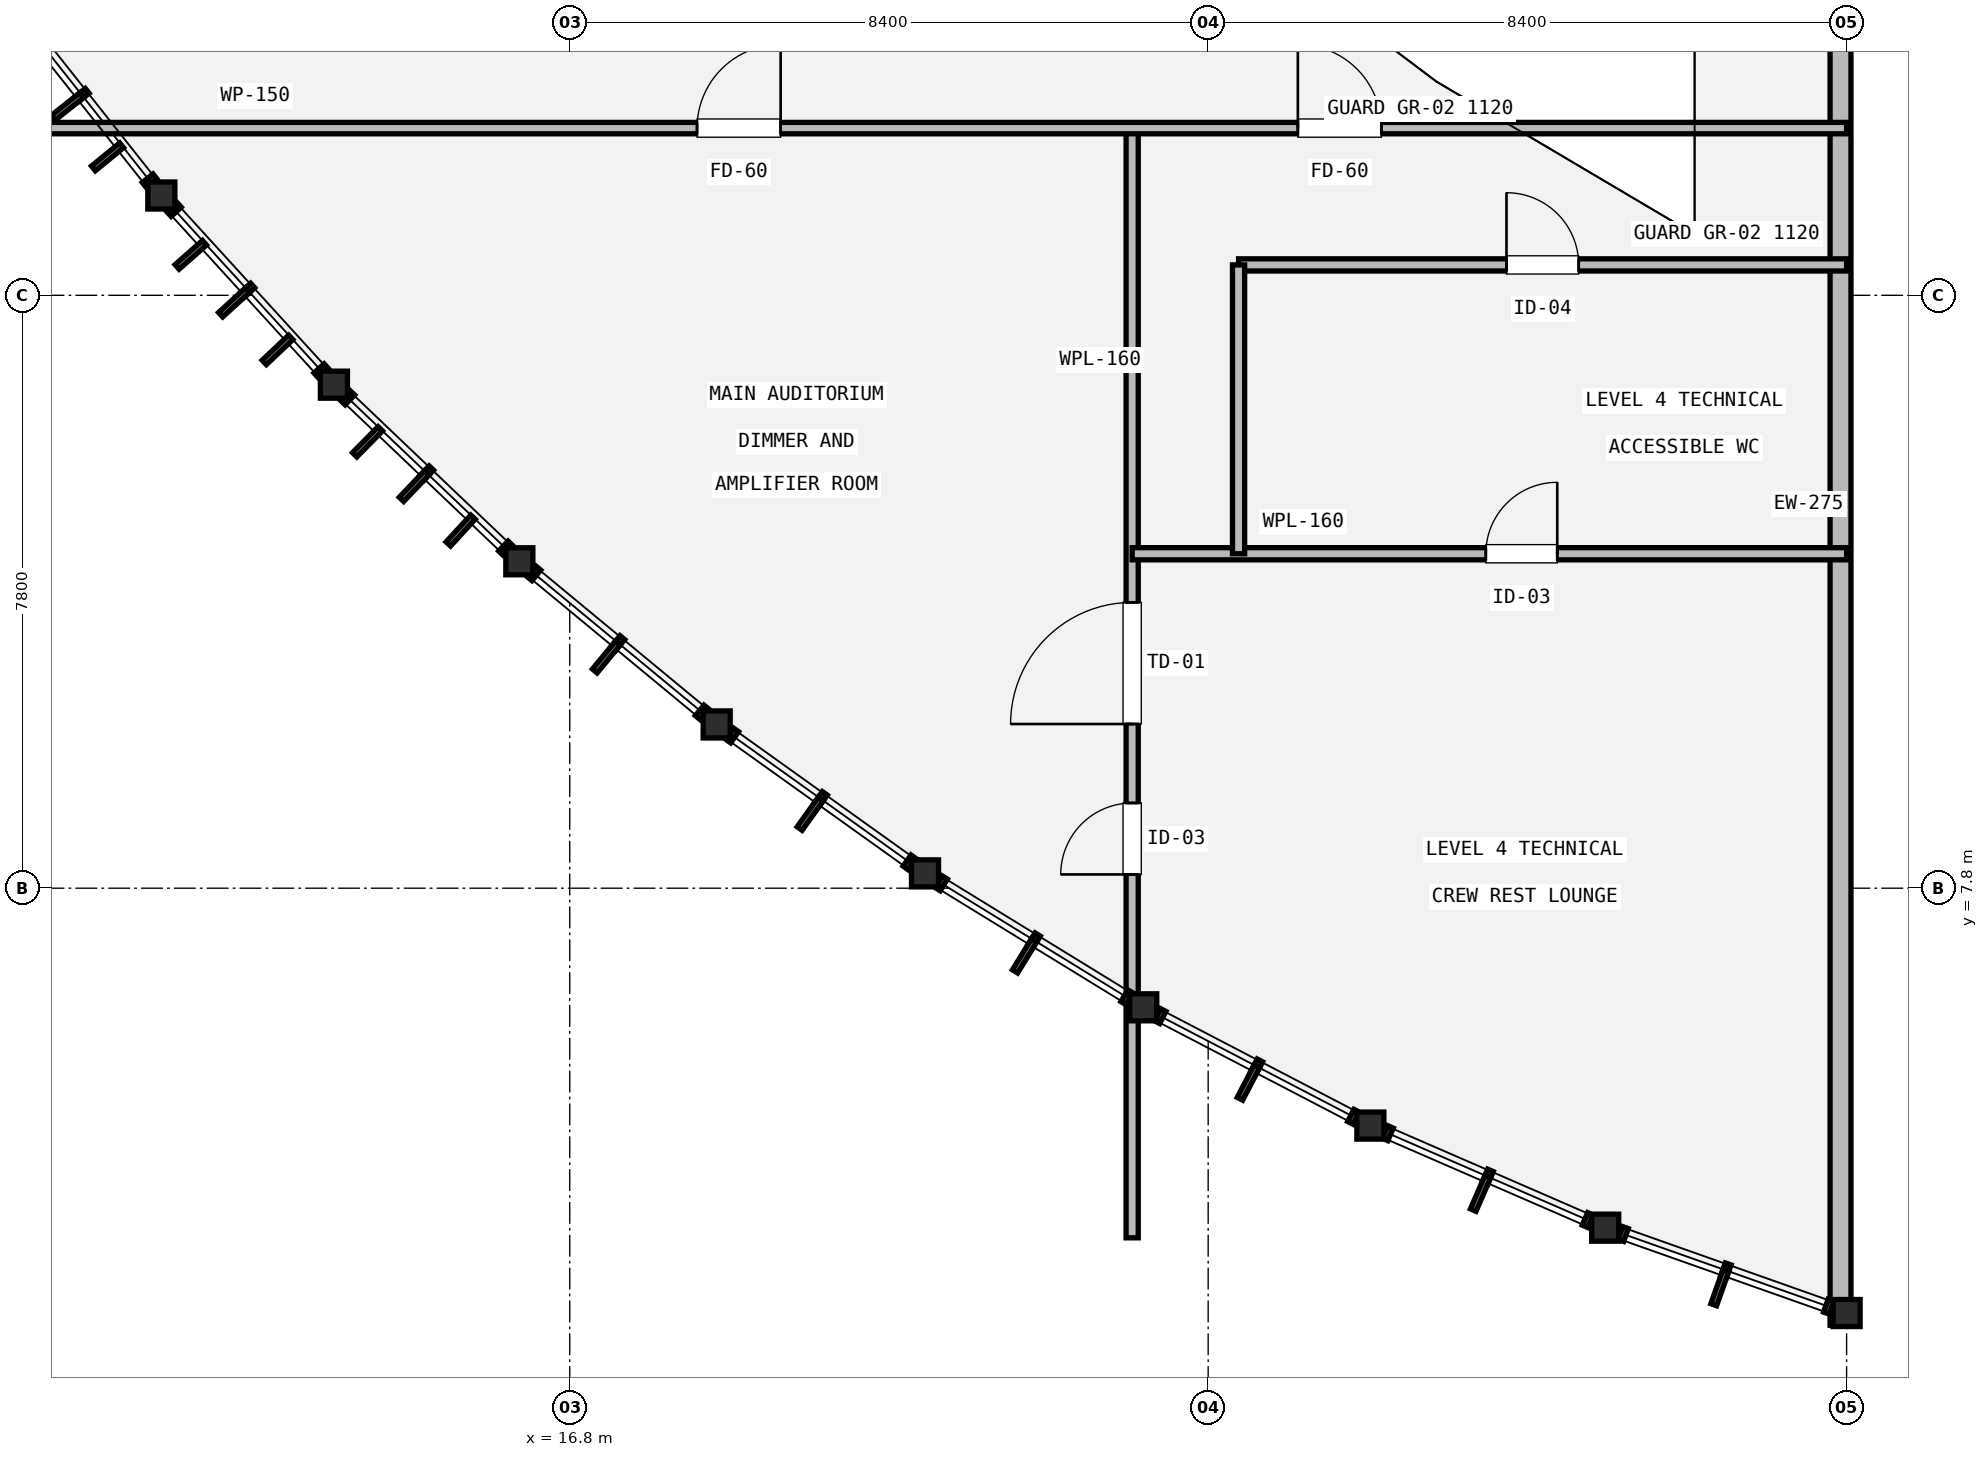
"""IFC4 building model, lengths in metres.
Left out: names, types, materials, properties, quantities, classifications, styles, units other than length and angle.
Written with IfcOpenShell. Run it as: python <this file> out.ifc"""

import sys

from ifc_helpers import new_model, si_unit, direction, frame, frame_2d, origin, origin_2d, place, context, subcontext, project, spatial, rectangle, hollow_circle, extrude, element, fill, save


model = new_model("IFC4")
c1 = context("Model", 3, precision=1e-05, world=origin(), true_north=direction((0.0, 1.0)))
c2 = subcontext(c1, "Body", "Model", "MODEL_VIEW")
j1 = project(units=[si_unit("LENGTHUNIT", "METRE"), si_unit("PLANEANGLEUNIT", "RADIAN")], contexts=[c1])
p1 = place(None, origin())
s1 = spatial("IfcSite", under=j1, at=p1, CompositionType="ELEMENT")
p2 = place(p1, origin())
s2 = spatial("IfcBuilding", under=s1, at=p2, CompositionType="ELEMENT")
p3 = place(p2, frame((0.0, 0.0, 19.2)))
s3 = spatial("IfcBuildingStorey", under=s2, at=p3, CompositionType="ELEMENT", Elevation=19.2)
for number, where, z_axis, x_axis in (
    (1, (11.427, 16.913, 0.0), (0.0, 0.0, 1.0), (1.0, 0.0, 0.0)),
    (2, (13.698, 14.424, 0.0), (0.0, 0.0, 1.0), (1.0, 0.0, 0.0)),
    (3, (16.137, 12.101, 0.0), (0.0, 0.0, 1.0), (1.0, 0.0, 0.0)),
    (4, (18.734, 9.954, 0.0), (0.0, 0.0, 1.0), (1.0, 0.0, 0.0)),
    (5, (21.474, 7.995, 0.0), (0.0, 0.0, 1.0), (1.0, 0.0, 0.0)),
    (6, (24.346, 6.233, 0.0), (0.0, 0.0, 1.0), (1.0, 0.0, 0.0)),
    (7, (27.334, 4.677, 0.0), (0.0, 0.0, 1.0), (1.0, 0.0, 0.0)),
    (8, (30.424, 3.334, 0.0), (0.0, 0.0, 1.0), (1.0, 0.0, 0.0)),
    (9, (33.6, 2.211, 0.0), (0.0, 0.0, 1.0), (1.0, 0.0, 0.0)),
):
    element("IfcColumn", number, at=place(p3, frame(where, z_axis=z_axis, x_axis=x_axis)), inside=s3, PredefinedType="COLUMN", context=c2, shape_type="SweptSolid", body=[
        extrude(hollow_circle(Radius=0.178, WallThickness=0.016, at=origin_2d()), origin(), (0.0, 0.0, 1.0), 4.2),
    ])
p4 = place(p3, frame((33.52, 2.05, 0.0), z_axis=(0.0, 0.0, 1.0), x_axis=(0.0, 1.0, 0.0)))
e10 = element("IfcWall", 10, at=p4, inside=s3, PredefinedType="STANDARD", context=c2, shape_type="SweptSolid", body=[
    extrude(rectangle(XDim=21.6, YDim=0.275, at=frame_2d((10.8, 0.0))), origin(), (0.0, 0.0, 1.0), 3.222),
])
p5 = place(p3, frame((24.2, 3.2, 0.0), z_axis=(0.0, 0.0, 1.0), x_axis=(0.0, 1.0, 0.0)))
e11 = element("IfcWall", 11, at=p5, inside=s3, PredefinedType="PLUMBINGWALL", context=c2, shape_type="SweptSolid", body=[
    extrude(rectangle(XDim=14.6, YDim=0.16, at=frame_2d((7.3, 0.0))), origin(), (0.0, 0.0, 1.0), 3.692),
])
p6 = place(p5, frame((4.781, 0.0, 0.0)))
e12 = element("IfcOpeningElement", 12, at=p6, cuts=e11, PredefinedType="OPENING", context=c2, shape_type="SweptSolid", body=[
    extrude(rectangle(XDim=0.94, YDim=2.1, at=frame_2d((0.47, 1.05))), frame((0.0, 0.09, 0.0), z_axis=(0.0, -1.0, 0.0), x_axis=(1.0, 0.0, 0.0)), (0.0, 0.0, 1.0), 0.18),
])
p7 = place(p5, frame((6.76, 0.0, 0.0)))
e13 = element("IfcOpeningElement", 13, at=p7, cuts=e11, PredefinedType="OPENING", context=c2, shape_type="SweptSolid", body=[
    extrude(rectangle(XDim=1.6, YDim=1.4, at=frame_2d((0.8, 0.7))), frame((0.0, 0.09, 0.0), z_axis=(0.0, -1.0, 0.0), x_axis=(1.0, 0.0, 0.0)), (0.0, 0.0, 1.0), 0.18),
])
p8 = place(p3, frame((24.2, 12.2, 0.0), z_axis=(0.0, 0.0, 1.0), x_axis=(1.0, 0.0, 0.0)))
e14 = element("IfcWall", 14, at=p8, inside=s3, PredefinedType="PLUMBINGWALL", context=c2, shape_type="SweptSolid", body=[
    extrude(rectangle(XDim=9.4, YDim=0.16, at=frame_2d((4.7, 0.0))), origin(), (0.0, 0.0, 1.0), 3.952),
])
p9 = place(p8, frame((4.653, 0.0, 0.0)))
e15 = element("IfcOpeningElement", 15, at=p9, cuts=e14, PredefinedType="OPENING", context=c2, shape_type="SweptSolid", body=[
    extrude(rectangle(XDim=0.94, YDim=2.1, at=frame_2d((0.47, 1.05))), frame((0.0, 0.09, 0.0), z_axis=(0.0, -1.0, 0.0), x_axis=(1.0, 0.0, 0.0)), (0.0, 0.0, 1.0), 0.18),
])
p10 = place(p3, frame((25.6, 16.0, 0.0), z_axis=(0.0, 0.0, 1.0), x_axis=(1.0, 0.0, 0.0)))
e16 = element("IfcWall", 16, at=p10, inside=s3, PredefinedType="PLUMBINGWALL", context=c2, shape_type="SweptSolid", body=[
    extrude(rectangle(XDim=8.0, YDim=0.16, at=frame_2d((4.0, 0.0))), origin(), (0.0, 0.0, 1.0), 3.952),
])
p11 = place(p10, frame((3.525, 0.0, 0.0)))
e17 = element("IfcOpeningElement", 17, at=p11, cuts=e16, PredefinedType="OPENING", context=c2, shape_type="SweptSolid", body=[
    extrude(rectangle(XDim=0.95, YDim=2.1, at=frame_2d((0.475, 1.05))), frame((0.0, 0.09, 0.0), z_axis=(0.0, -1.0, 0.0), x_axis=(1.0, 0.0, 0.0)), (0.0, 0.0, 1.0), 0.18),
])
p12 = place(p3, frame((25.6, 12.2, 0.0), z_axis=(0.0, 0.0, 1.0), x_axis=(0.0, 1.0, 0.0)))
e18 = element("IfcWall", 18, at=p12, inside=s3, PredefinedType="PLUMBINGWALL", context=c2, shape_type="SweptSolid", body=[
    extrude(rectangle(XDim=3.8, YDim=0.16, at=frame_2d((1.9, 0.0))), origin(), (0.0, 0.0, 1.0), 3.952),
])
p13 = place(p3, frame((7.0, 17.8, 0.0), z_axis=(0.0, 0.0, 1.0), x_axis=(1.0, 0.0, 0.0)))
e19 = element("IfcWall", 19, at=p13, inside=s3, PredefinedType="PARTITIONING", context=c2, shape_type="SweptSolid", body=[
    extrude(rectangle(XDim=26.6, YDim=0.15, at=frame_2d((13.3, 0.0))), origin(), (0.0, 0.0, 1.0), 3.692),
])
p14 = place(p13, frame((11.475, 0.0, 0.0)))
e20 = element("IfcOpeningElement", 20, at=p14, cuts=e19, PredefinedType="OPENING", context=c2, shape_type="SweptSolid", body=[
    extrude(rectangle(XDim=1.1, YDim=2.15, at=frame_2d((0.55, 1.075))), frame((0.0, 0.085, 0.0), z_axis=(0.0, -1.0, 0.0), x_axis=(1.0, 0.0, 0.0)), (0.0, 0.0, 1.0), 0.17),
])
p15 = place(p13, frame((19.38, 0.0, 0.0)))
e21 = element("IfcOpeningElement", 21, at=p15, cuts=e19, PredefinedType="OPENING", context=c2, shape_type="SweptSolid", body=[
    extrude(rectangle(XDim=1.1, YDim=2.15, at=frame_2d((0.55, 1.075))), frame((0.0, 0.085, 0.0), z_axis=(0.0, -1.0, 0.0), x_axis=(1.0, 0.0, 0.0)), (0.0, 0.0, 1.0), 0.17),
])
p16 = place(p6, origin())
e22 = element("IfcDoor", 22, at=p16, inside=s3, OperationType="SINGLE_SWING_LEFT", PredefinedType="DOOR", context=c2, shape_type="SweptSolid", body=[
    extrude(rectangle(XDim=0.94, YDim=2.1, at=frame_2d((0.47, 1.05))), frame((0.0, 0.025, 0.0), z_axis=(0.0, -1.0, 0.0), x_axis=(1.0, 0.0, 0.0)), (0.0, 0.0, 1.0), 0.05),
])
fill(e12, e22)
p17 = place(p7, origin())
e23 = element("IfcDoor", 23, at=p17, inside=s3, OperationType="SWING_FIXED_LEFT", PredefinedType="TRAPDOOR", context=c2, shape_type="SweptSolid", body=[
    extrude(rectangle(XDim=1.6, YDim=1.4, at=frame_2d((0.8, 0.7))), frame((0.0, 0.025, 0.0), z_axis=(0.0, -1.0, 0.0), x_axis=(1.0, 0.0, 0.0)), (0.0, 0.0, 1.0), 0.05),
])
fill(e13, e23)
p18 = place(p9, origin())
e24 = element("IfcDoor", 24, at=p18, inside=s3, OperationType="SINGLE_SWING_RIGHT", PredefinedType="DOOR", context=c2, shape_type="SweptSolid", body=[
    extrude(rectangle(XDim=0.94, YDim=2.1, at=frame_2d((0.47, 1.05))), frame((0.0, 0.025, 0.0), z_axis=(0.0, -1.0, 0.0), x_axis=(1.0, 0.0, 0.0)), (0.0, 0.0, 1.0), 0.05),
])
fill(e15, e24)
p19 = place(p11, origin())
e25 = element("IfcDoor", 25, at=p19, inside=s3, OperationType="SINGLE_SWING_LEFT", PredefinedType="DOOR", context=c2, shape_type="SweptSolid", body=[
    extrude(rectangle(XDim=0.95, YDim=2.1, at=frame_2d((0.475, 1.05))), frame((0.0, 0.025, 0.0), z_axis=(0.0, -1.0, 0.0), x_axis=(1.0, 0.0, 0.0)), (0.0, 0.0, 1.0), 0.05),
])
fill(e17, e25)
p20 = place(p14, origin())
e26 = element("IfcDoor", 26, at=p20, inside=s3, OperationType="SINGLE_SWING_RIGHT", PredefinedType="DOOR", context=c2, shape_type="SweptSolid", body=[
    extrude(rectangle(XDim=1.1, YDim=2.15, at=frame_2d((0.55, 1.075))), frame((0.0, 0.025, 0.0), z_axis=(0.0, -1.0, 0.0), x_axis=(1.0, 0.0, 0.0)), (0.0, 0.0, 1.0), 0.05),
])
fill(e20, e26)
p21 = place(p15, origin())
e27 = element("IfcDoor", 27, at=p21, inside=s3, OperationType="SINGLE_SWING_LEFT", PredefinedType="DOOR", context=c2, shape_type="SweptSolid", body=[
    extrude(rectangle(XDim=1.1, YDim=2.15, at=frame_2d((0.55, 1.075))), frame((0.0, 0.025, 0.0), z_axis=(0.0, -1.0, 0.0), x_axis=(1.0, 0.0, 0.0)), (0.0, 0.0, 1.0), 0.05),
])
fill(e21, e27)
save(model, sys.argv[1])
